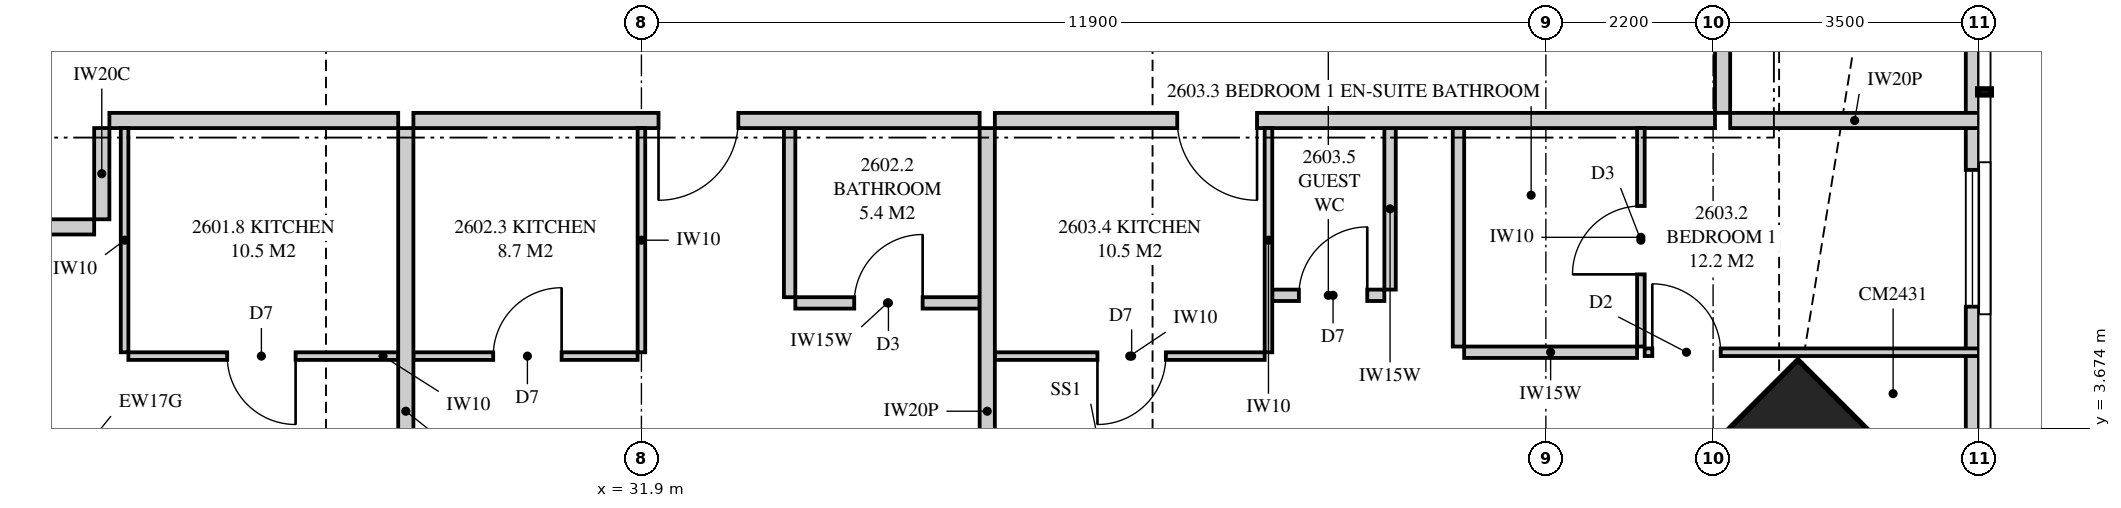
"""IFC4 building model, lengths in metres.
Left out: names, types, materials, properties, quantities, classifications, styles, units other than length and angle.
Written with IfcOpenShell. Run it as: python <this file> out.ifc"""

import sys

from ifc_helpers import new_model, si_unit, direction, frame, frame_2d, origin, origin_2d, place, context, subcontext, project, spatial, polyline, rectangle, outline, extrude, element, fill, save


model = new_model("IFC4")
c1 = context("Model", 3, precision=1e-05, world=origin(), true_north=direction((0.0, 1.0)))
c2 = subcontext(c1, "Body", "Model", "MODEL_VIEW")
j1 = project(units=[si_unit("LENGTHUNIT", "METRE"), si_unit("PLANEANGLEUNIT", "RADIAN")], contexts=[c1])
p1 = place(None, origin())
s1 = spatial("IfcSite", under=j1, at=p1, CompositionType="ELEMENT")
p2 = place(p1, origin())
s2 = spatial("IfcBuilding", under=s1, at=p2, CompositionType="ELEMENT")
p3 = place(p2, frame((0.0, 0.0, 98.15)))
s3 = spatial("IfcBuildingStorey", under=s2, at=p3, CompositionType="ELEMENT", Elevation=98.15)
p4 = place(p3, frame((46.869, 2.631, 0.0), z_axis=(0.0, 0.0, 1.0), x_axis=(-0.707106781187, 0.707106781187, 0.0)))
e1 = element("IfcColumn", 1, at=p4, inside=s3, PredefinedType="COLUMN", context=c2, shape_type="SweptSolid", body=[
    extrude(rectangle(XDim=2.4, YDim=3.1, at=origin_2d()), origin(), (0.0, 0.0, 1.0), 3.35),
])
p5 = place(p3, frame((49.413, 3.051, 0.0), z_axis=(0.0, 0.0, 1.0), x_axis=(0.0, 1.0, 0.0)))
e2 = element("IfcWall", 2, at=p5, inside=s3, PredefinedType="SOLIDWALL", context=c2, shape_type="SweptSolid", body=[
    extrude(outline(polyline([(0.0, 0.0), (31.897, 0.0), (31.897, 3.11), (22.167, 3.11), (22.167, 2.15), (22.074, 2.15), (22.074, 3.11), (21.949, 3.11), (21.949, 2.15), (9.949, 2.15), (9.949, 3.11), (9.823, 3.11), (9.823, 2.15), (9.73, 2.15), (9.73, 3.11), (0.0, 3.11), (0.0, 0.0)])), frame((0.0, 0.087, 0.0), z_axis=(0.0, -1.0, 0.0), x_axis=(1.0, 0.0, 0.0)), (0.0, 0.0, 1.0), 0.175),
])
p6 = place(p5, frame((2.224, 0.0, 0.4)))
e3 = element("IfcOpeningElement", 3, at=p6, cuts=e2, PredefinedType="OPENING", context=c2, shape_type="SweptSolid", body=[
    extrude(rectangle(XDim=1.8, YDim=1.7, at=frame_2d((0.9, 0.85))), frame((0.0, 0.097, 0.0), z_axis=(0.0, -1.0, 0.0), x_axis=(1.0, 0.0, 0.0)), (0.0, 0.0, 1.0), 0.195),
])
p7 = place(p5, frame((14.849, 0.0, 0.4)))
e4 = element("IfcOpeningElement", 4, at=p7, cuts=e2, PredefinedType="OPENING", context=c2, shape_type="SweptSolid", body=[
    extrude(rectangle(XDim=1.2, YDim=1.7, at=frame_2d((0.6, 0.85))), frame((0.0, 0.097, 0.0), z_axis=(0.0, -1.0, 0.0), x_axis=(1.0, 0.0, 0.0)), (0.0, 0.0, 1.0), 0.195),
])
p8 = place(p5, frame((27.373, 0.0, 0.4)))
e5 = element("IfcOpeningElement", 5, at=p8, cuts=e2, PredefinedType="OPENING", context=c2, shape_type="SweptSolid", body=[
    extrude(rectangle(XDim=1.8, YDim=1.7, at=frame_2d((0.9, 0.85))), frame((0.0, 0.097, 0.0), z_axis=(0.0, -1.0, 0.0), x_axis=(1.0, 0.0, 0.0)), (0.0, 0.0, 1.0), 0.195),
])
p9 = place(p3, frame((28.8, 0.175, 0.0), z_axis=(0.0, 0.0, 1.0), x_axis=(0.0, 1.0, 0.0)))
e6 = element("IfcWall", 6, at=p9, inside=s3, PredefinedType="PARTITIONING", context=c2, shape_type="SweptSolid", body=[
    extrude(outline(polyline([(0.529, 2.15), (0.0, 2.15), (0.0, 0.0), (0.529, 0.0), (0.529, 0.786), (1.021, 0.786), (1.021, 0.0), (7.45, 0.0), (7.45, 3.11), (1.685, 3.11), (1.685, 2.15), (1.021, 2.15), (1.021, 1.364), (0.529, 1.364), (0.529, 2.15)])), frame((0.0, 0.1, 0.0), z_axis=(0.0, -1.0, 0.0), x_axis=(1.0, 0.0, 0.0)), (0.0, 0.0, 1.0), 0.2),
])
p10 = place(p3, frame((25.15, 4.625, 0.0), z_axis=(0.0, 0.0, 1.0), x_axis=(1.0, 0.0, 0.0)))
e7 = element("IfcWall", 7, at=p10, inside=s3, PredefinedType="PARTITIONING", context=c2, shape_type="SweptSolid", body=[
    extrude(outline(polyline([(0.0, 0.0), (3.55, 0.0), (3.55, 3.11), (2.887, 3.11), (2.887, 2.541), (2.312, 2.541), (2.312, 3.11), (0.0, 3.11), (0.0, 0.0)])), frame((0.0, 0.05, 0.0), z_axis=(0.0, -1.0, 0.0), x_axis=(1.0, 0.0, 0.0)), (0.0, 0.0, 1.0), 0.1),
])
p11 = place(p10, frame((1.3, 0.0, 0.0)))
e8 = element("IfcOpeningElement", 8, at=p11, cuts=e7, PredefinedType="OPENING", context=c2, shape_type="SweptSolid", body=[
    extrude(rectangle(XDim=0.9, YDim=2.1, at=frame_2d((0.45, 1.05))), frame((0.0, 0.06, 0.0), z_axis=(0.0, -1.0, 0.0), x_axis=(1.0, 0.0, 0.0)), (0.0, 0.0, 1.0), 0.12),
])
p12 = place(p3, frame((25.1, 4.675, 0.0), z_axis=(0.0, 0.0, 1.0), x_axis=(0.0, 1.0, 0.0)))
e9 = element("IfcWall", 9, at=p12, inside=s3, PredefinedType="PARTITIONING", context=c2, shape_type="SweptSolid", body=[
    extrude(rectangle(XDim=2.95, YDim=0.1, at=frame_2d((1.475, 0.0))), origin(), (0.0, 0.0, 1.0), 3.11),
])
p13 = place(p3, frame((36.45, 0.175, 0.0), z_axis=(0.0, 0.0, 1.0), x_axis=(0.0, 1.0, 0.0)))
e10 = element("IfcWall", 10, at=p13, inside=s3, PredefinedType="PARTITIONING", context=c2, shape_type="SweptSolid", body=[
    extrude(outline(polyline([(0.529, 2.15), (0.0, 2.15), (0.0, 0.0), (0.529, 0.0), (0.529, 0.017), (1.021, 0.017), (1.021, 0.0), (7.45, 0.0), (7.45, 3.11), (1.685, 3.11), (1.685, 2.15), (1.021, 2.15), (1.021, 2.133), (0.529, 2.133), (0.529, 2.15)])), frame((0.0, 0.1, 0.0), z_axis=(0.0, -1.0, 0.0), x_axis=(1.0, 0.0, 0.0)), (0.0, 0.0, 1.0), 0.2),
])
p14 = place(p3, frame((28.9, 7.725, 0.0), z_axis=(0.0, 0.0, 1.0), x_axis=(1.0, 0.0, 0.0)))
e11 = element("IfcWall", 11, at=p14, inside=s3, PredefinedType="PARTITIONING", context=c2, shape_type="SweptSolid", body=[
    extrude(rectangle(XDim=7.45, YDim=0.2, at=frame_2d((3.725, 0.0))), origin(), (0.0, 0.0, 1.0), 3.11),
])
p15 = place(p14, frame((3.225, 0.0, 0.0)))
e12 = element("IfcOpeningElement", 12, at=p15, cuts=e11, PredefinedType="OPENING", context=c2, shape_type="SweptSolid", body=[
    extrude(rectangle(XDim=1.05, YDim=2.2, at=frame_2d((0.525, 1.1))), frame((0.0, 0.11, 0.0), z_axis=(0.0, -1.0, 0.0), x_axis=(1.0, 0.0, 0.0)), (0.0, 0.0, 1.0), 0.22),
])
p16 = place(p3, frame((33.925, 5.325, 0.0), z_axis=(0.0, 0.0, 1.0), x_axis=(1.0, 0.0, 0.0)))
e13 = element("IfcWall", 13, at=p16, inside=s3, PredefinedType="PLUMBINGWALL", context=c2, shape_type="SweptSolid", body=[
    extrude(rectangle(XDim=2.425, YDim=0.15, at=frame_2d((1.212, 0.0))), origin(), (0.0, 0.0, 1.0), 3.11),
])
p17 = place(p16, frame((0.775, 0.0, 0.0)))
e14 = element("IfcOpeningElement", 14, at=p17, cuts=e13, PredefinedType="OPENING", context=c2, shape_type="SweptSolid", body=[
    extrude(rectangle(XDim=0.9, YDim=2.1, at=frame_2d((0.45, 1.05))), frame((0.0, 0.085, 0.0), z_axis=(0.0, -1.0, 0.0), x_axis=(1.0, 0.0, 0.0)), (0.0, 0.0, 1.0), 0.17),
])
p18 = place(p3, frame((33.85, 5.4, 0.0), z_axis=(0.0, 0.0, 1.0), x_axis=(0.0, 1.0, 0.0)))
e15 = element("IfcWall", 15, at=p18, inside=s3, PredefinedType="PLUMBINGWALL", context=c2, shape_type="SweptSolid", body=[
    extrude(rectangle(XDim=2.225, YDim=0.15, at=frame_2d((1.113, 0.0))), origin(), (0.0, 0.0, 1.0), 3.11),
])
p19 = place(p3, frame((28.9, 4.625, 0.0), z_axis=(0.0, 0.0, 1.0), x_axis=(1.0, 0.0, 0.0)))
e16 = element("IfcWall", 16, at=p19, inside=s3, PredefinedType="PARTITIONING", context=c2, shape_type="SweptSolid", body=[
    extrude(rectangle(XDim=2.95, YDim=0.1, at=frame_2d((1.475, 0.0))), origin(), (0.0, 0.0, 1.0), 3.11),
])
p20 = place(p19, frame((1.05, 0.0, 0.0)))
e17 = element("IfcOpeningElement", 17, at=p20, cuts=e16, PredefinedType="OPENING", context=c2, shape_type="SweptSolid", body=[
    extrude(rectangle(XDim=0.9, YDim=2.1, at=frame_2d((0.45, 1.05))), frame((0.0, 0.06, 0.0), z_axis=(0.0, -1.0, 0.0), x_axis=(1.0, 0.0, 0.0)), (0.0, 0.0, 1.0), 0.12),
])
p21 = place(p3, frame((31.9, 4.675, 0.0), z_axis=(0.0, 0.0, 1.0), x_axis=(0.0, 1.0, 0.0)))
e18 = element("IfcWall", 18, at=p21, inside=s3, PredefinedType="PARTITIONING", context=c2, shape_type="SweptSolid", body=[
    extrude(rectangle(XDim=2.95, YDim=0.1, at=frame_2d((1.475, 0.0))), origin(), (0.0, 0.0, 1.0), 3.11),
])
p22 = place(p3, frame((36.55, 7.725, 0.0), z_axis=(0.0, 0.0, 1.0), x_axis=(1.0, 0.0, 0.0)))
e19 = element("IfcWall", 19, at=p22, inside=s3, PredefinedType="PARTITIONING", context=c2, shape_type="SweptSolid", body=[
    extrude(outline(polyline([(0.0, 0.0), (9.475, 0.0), (9.475, 3.11), (2.412, 3.11), (2.412, 2.541), (1.738, 2.541), (1.738, 3.11), (0.0, 3.11), (0.0, 0.0)])), frame((0.0, 0.1, 0.0), z_axis=(0.0, -1.0, 0.0), x_axis=(1.0, 0.0, 0.0)), (0.0, 0.0, 1.0), 0.2),
])
p23 = place(p22, frame((2.4, 0.0, 0.0)))
e20 = element("IfcOpeningElement", 20, at=p23, cuts=e19, PredefinedType="OPENING", context=c2, shape_type="SweptSolid", body=[
    extrude(rectangle(XDim=1.05, YDim=2.2, at=frame_2d((0.525, 1.1))), frame((0.0, 0.11, 0.0), z_axis=(0.0, -1.0, 0.0), x_axis=(1.0, 0.0, 0.0)), (0.0, 0.0, 1.0), 0.22),
])
p24 = place(p3, frame((45.05, 4.751, 0.0), z_axis=(0.0, 0.0, 1.0), x_axis=(0.0, 1.0, 0.0)))
e21 = element("IfcWall", 21, at=p24, inside=s3, PredefinedType="PARTITIONING", context=c2, shape_type="SweptSolid", body=[
    extrude(rectangle(XDim=2.874, YDim=0.1, at=frame_2d((1.437, 0.0))), origin(), (0.0, 0.0, 1.0), 3.11),
])
p25 = place(p24, frame((0.949, 0.0, 0.0)))
e22 = element("IfcOpeningElement", 22, at=p25, cuts=e21, PredefinedType="OPENING", context=c2, shape_type="SweptSolid", body=[
    extrude(rectangle(XDim=0.9, YDim=2.1, at=frame_2d((0.45, 1.05))), frame((0.0, 0.06, 0.0), z_axis=(0.0, -1.0, 0.0), x_axis=(1.0, 0.0, 0.0)), (0.0, 0.0, 1.0), 0.12),
])
p26 = place(p3, frame((45.1, 4.676, 0.0), z_axis=(0.0, 0.0, 1.0), x_axis=(1.0, 0.0, 0.0)))
e23 = element("IfcWall", 23, at=p26, inside=s3, PredefinedType="PARTITIONING", context=c2, shape_type="SweptSolid", body=[
    extrude(outline(polyline([(0.0, 0.0), (4.4, 0.0), (4.4, 3.11), (2.971, 3.11), (2.971, 2.15), (1.229, 2.15), (1.229, 3.11), (0.0, 3.11), (0.0, 0.0)])), frame((0.0, 0.05, 0.0), z_axis=(0.0, -1.0, 0.0), x_axis=(1.0, 0.0, 0.0)), (0.0, 0.0, 1.0), 0.1),
])
p27 = place(p26, frame((0.1, 0.0, 0.0)))
e24 = element("IfcOpeningElement", 24, at=p27, cuts=e23, PredefinedType="OPENING", context=c2, shape_type="SweptSolid", body=[
    extrude(rectangle(XDim=0.9, YDim=2.1, at=frame_2d((0.45, 1.05))), frame((0.0, 0.06, 0.0), z_axis=(0.0, -1.0, 0.0), x_axis=(1.0, 0.0, 0.0)), (0.0, 0.0, 1.0), 0.12),
])
p28 = place(p3, frame((42.725, 4.676, 0.0), z_axis=(0.0, 0.0, 1.0), x_axis=(1.0, 0.0, 0.0)))
e25 = element("IfcWall", 25, at=p28, inside=s3, PredefinedType="PLUMBINGWALL", context=c2, shape_type="SweptSolid", body=[
    extrude(rectangle(XDim=2.275, YDim=0.15, at=frame_2d((1.137, 0.0))), origin(), (0.0, 0.0, 1.0), 3.11),
])
p29 = place(p3, frame((42.65, 4.751, 0.0), z_axis=(0.0, 0.0, 1.0), x_axis=(0.0, 1.0, 0.0)))
e26 = element("IfcWall", 26, at=p29, inside=s3, PredefinedType="PLUMBINGWALL", context=c2, shape_type="SweptSolid", body=[
    extrude(rectangle(XDim=2.874, YDim=0.15, at=frame_2d((1.437, 0.0))), origin(), (0.0, 0.0, 1.0), 3.11),
])
p30 = place(p3, frame((36.55, 4.625, 0.0), z_axis=(0.0, 0.0, 1.0), x_axis=(1.0, 0.0, 0.0)))
e27 = element("IfcWall", 27, at=p30, inside=s3, PredefinedType="PARTITIONING", context=c2, shape_type="SweptSolid", body=[
    extrude(outline(polyline([(0.0, 0.0), (3.55, 0.0), (3.55, 3.11), (2.362, 3.11), (2.362, 2.541), (1.788, 2.541), (1.788, 3.11), (0.0, 3.11), (0.0, 0.0)])), frame((0.0, 0.05, 0.0), z_axis=(0.0, -1.0, 0.0), x_axis=(1.0, 0.0, 0.0)), (0.0, 0.0, 1.0), 0.1),
])
p31 = place(p30, frame((1.35, 0.0, 0.0)))
e28 = element("IfcOpeningElement", 28, at=p31, cuts=e27, PredefinedType="OPENING", context=c2, shape_type="SweptSolid", body=[
    extrude(rectangle(XDim=0.9, YDim=2.1, at=frame_2d((0.45, 1.05))), frame((0.0, 0.06, 0.0), z_axis=(0.0, -1.0, 0.0), x_axis=(1.0, 0.0, 0.0)), (0.0, 0.0, 1.0), 0.12),
])
p32 = place(p3, frame((40.15, 4.675, 0.0), z_axis=(0.0, 0.0, 1.0), x_axis=(0.0, 1.0, 0.0)))
e29 = element("IfcWall", 29, at=p32, inside=s3, PredefinedType="PARTITIONING", context=c2, shape_type="SweptSolid", body=[
    extrude(rectangle(XDim=2.95, YDim=0.1, at=frame_2d((1.475, 0.0))), origin(), (0.0, 0.0, 1.0), 3.11),
])
p33 = place(p3, frame((40.2, 5.425, 0.0), z_axis=(0.0, 0.0, 1.0), x_axis=(1.0, 0.0, 0.0)))
e30 = element("IfcWall", 30, at=p33, inside=s3, PredefinedType="PLUMBINGWALL", context=c2, shape_type="SweptSolid", body=[
    extrude(rectangle(XDim=1.475, YDim=0.15, at=frame_2d((0.738, 0.0))), origin(), (0.0, 0.0, 1.0), 3.11),
])
p34 = place(p33, frame((0.35, 0.0, 0.0)))
e31 = element("IfcOpeningElement", 31, at=p34, cuts=e30, PredefinedType="OPENING", context=c2, shape_type="SweptSolid", body=[
    extrude(rectangle(XDim=0.9, YDim=2.1, at=frame_2d((0.45, 1.05))), frame((0.0, 0.085, 0.0), z_axis=(0.0, -1.0, 0.0), x_axis=(1.0, 0.0, 0.0)), (0.0, 0.0, 1.0), 0.17),
])
p35 = place(p3, frame((41.75, 5.5, 0.0), z_axis=(0.0, 0.0, 1.0), x_axis=(0.0, 1.0, 0.0)))
e32 = element("IfcWall", 32, at=p35, inside=s3, PredefinedType="PLUMBINGWALL", context=c2, shape_type="SweptSolid", body=[
    extrude(rectangle(XDim=2.125, YDim=0.15, at=frame_2d((1.062, 0.0))), origin(), (0.0, 0.0, 1.0), 3.11),
])
p36 = place(p3, frame((46.225, 7.725, 0.0), z_axis=(0.0, 0.0, 1.0), x_axis=(1.0, 0.0, 0.0)))
e33 = element("IfcWall", 33, at=p36, inside=s3, PredefinedType="PARTITIONING", context=c2, shape_type="SweptSolid", body=[
    extrude(outline(polyline([(0.0, 0.0), (3.275, 0.0), (3.275, 3.11), (2.392, 3.11), (2.392, 2.15), (0.643, 2.15), (0.643, 2.541), (0.306, 2.541), (0.306, 3.11), (0.0, 3.11), (0.0, 0.0)])), frame((0.0, 0.1, 0.0), z_axis=(0.0, -1.0, 0.0), x_axis=(1.0, 0.0, 0.0)), (0.0, 0.0, 1.0), 0.2),
])
p37 = place(p3, frame((46.125, 7.825, 0.0), z_axis=(0.0, 0.0, 1.0), x_axis=(0.0, 1.0, 0.0)))
e34 = element("IfcWall", 34, at=p37, inside=s3, PredefinedType="PARTITIONING", context=c2, shape_type="SweptSolid", body=[
    extrude(outline(polyline([(0.0, 0.0), (8.475, 0.0), (8.475, 3.11), (5.512, 3.11), (5.512, 2.541), (4.838, 2.541), (4.838, 3.11), (0.0, 3.11), (0.0, 0.0)])), frame((0.0, 0.1, 0.0), z_axis=(0.0, -1.0, 0.0), x_axis=(1.0, 0.0, 0.0)), (0.0, 0.0, 1.0), 0.2),
])
p38 = place(p3, frame((24.9, 7.725, 0.0), z_axis=(0.0, 0.0, 1.0), x_axis=(1.0, 0.0, 0.0)))
e35 = element("IfcWall", 35, at=p38, inside=s3, PredefinedType="PARTITIONING", context=c2, shape_type="SweptSolid", body=[
    extrude(outline(polyline([(0.0, 0.0), (3.8, 0.0), (3.8, 3.11), (3.187, 3.11), (3.187, 2.541), (2.513, 2.541), (2.513, 3.11), (0.0, 3.11), (0.0, 0.0)])), frame((0.0, 0.1, 0.0), z_axis=(0.0, -1.0, 0.0), x_axis=(1.0, 0.0, 0.0)), (0.0, 0.0, 1.0), 0.2),
])
p39 = place(p3, frame((22.3, 6.325, 0.0), z_axis=(0.0, 0.0, 1.0), x_axis=(1.0, 0.0, 0.0)))
e36 = element("IfcWall", 36, at=p39, inside=s3, PredefinedType="PARTITIONING", context=c2, shape_type="SweptSolid", body=[
    extrude(rectangle(XDim=2.4, YDim=0.2, at=frame_2d((1.2, 0.0))), origin(), (0.0, 0.0, 1.0), 3.11),
])
p40 = place(p39, frame((0.1, 0.0, 0.0)))
e37 = element("IfcOpeningElement", 37, at=p40, cuts=e36, PredefinedType="OPENING", context=c2, shape_type="SweptSolid", body=[
    extrude(rectangle(XDim=1.05, YDim=2.2, at=frame_2d((0.525, 1.1))), frame((0.0, 0.11, 0.0), z_axis=(0.0, -1.0, 0.0), x_axis=(1.0, 0.0, 0.0)), (0.0, 0.0, 1.0), 0.22),
])
p41 = place(p3, frame((24.8, 7.625, 0.0), z_axis=(0.0, 0.0, 1.0), x_axis=(0.0, -1.0, 0.0)))
e38 = element("IfcWall", 38, at=p41, inside=s3, PredefinedType="PARTITIONING", context=c2, shape_type="SweptSolid", body=[
    extrude(rectangle(XDim=1.2, YDim=0.2, at=frame_2d((0.6, 0.0))), origin(), (0.0, 0.0, 1.0), 3.11),
])
p42 = place(p6, origin())
e39 = element("IfcWindow", 39, at=p42, inside=s3, PartitioningType="SINGLE_PANEL", PredefinedType="WINDOW", context=c2, shape_type="SweptSolid", body=[
    extrude(rectangle(XDim=1.8, YDim=1.7, at=frame_2d((0.9, 0.85))), frame((0.0, 0.03, 0.0), z_axis=(0.0, -1.0, 0.0), x_axis=(1.0, 0.0, 0.0)), (0.0, 0.0, 1.0), 0.06),
])
fill(e3, e39)
p43 = place(p11, frame((0.9, 0.0, 0.0), z_axis=(0.0, 0.0, 1.0), x_axis=(-1.0, 0.0, 0.0)))
e40 = element("IfcDoor", 40, at=p43, inside=s3, OperationType="SINGLE_SWING_LEFT", PredefinedType="DOOR", context=c2, shape_type="SweptSolid", body=[
    extrude(rectangle(XDim=0.9, YDim=2.1, at=frame_2d((0.45, 1.05))), frame((0.0, 0.025, 0.0), z_axis=(0.0, -1.0, 0.0), x_axis=(1.0, 0.0, 0.0)), (0.0, 0.0, 1.0), 0.05),
])
fill(e8, e40)
p44 = place(p15, frame((1.05, 0.0, 0.0), z_axis=(0.0, 0.0, 1.0), x_axis=(-1.0, 0.0, 0.0)))
e41 = element("IfcDoor", 41, at=p44, inside=s3, OperationType="SINGLE_SWING_RIGHT", PredefinedType="DOOR", context=c2, shape_type="SweptSolid", body=[
    extrude(rectangle(XDim=1.05, YDim=2.2, at=frame_2d((0.525, 1.1))), frame((0.0, 0.025, 0.0), z_axis=(0.0, -1.0, 0.0), x_axis=(1.0, 0.0, 0.0)), (0.0, 0.0, 1.0), 0.05),
])
fill(e12, e41)
p45 = place(p17, origin())
e42 = element("IfcDoor", 42, at=p45, inside=s3, OperationType="SINGLE_SWING_RIGHT", PredefinedType="DOOR", context=c2, shape_type="SweptSolid", body=[
    extrude(rectangle(XDim=0.9, YDim=2.1, at=frame_2d((0.45, 1.05))), frame((0.0, 0.025, 0.0), z_axis=(0.0, -1.0, 0.0), x_axis=(1.0, 0.0, 0.0)), (0.0, 0.0, 1.0), 0.05),
])
fill(e14, e42)
p46 = place(p20, origin())
e43 = element("IfcDoor", 43, at=p46, inside=s3, OperationType="SINGLE_SWING_RIGHT", PredefinedType="DOOR", context=c2, shape_type="SweptSolid", body=[
    extrude(rectangle(XDim=0.9, YDim=2.1, at=frame_2d((0.45, 1.05))), frame((0.0, 0.025, 0.0), z_axis=(0.0, -1.0, 0.0), x_axis=(1.0, 0.0, 0.0)), (0.0, 0.0, 1.0), 0.05),
])
fill(e17, e43)
p47 = place(p23, frame((1.05, 0.0, 0.0), z_axis=(0.0, 0.0, 1.0), x_axis=(-1.0, 0.0, 0.0)))
e44 = element("IfcDoor", 44, at=p47, inside=s3, OperationType="SINGLE_SWING_LEFT", PredefinedType="DOOR", context=c2, shape_type="SweptSolid", body=[
    extrude(rectangle(XDim=1.05, YDim=2.2, at=frame_2d((0.525, 1.1))), frame((0.0, 0.025, 0.0), z_axis=(0.0, -1.0, 0.0), x_axis=(1.0, 0.0, 0.0)), (0.0, 0.0, 1.0), 0.05),
])
fill(e20, e44)
p48 = place(p27, origin())
e45 = element("IfcDoor", 45, at=p48, inside=s3, OperationType="SINGLE_SWING_LEFT", PredefinedType="DOOR", context=c2, shape_type="SweptSolid", body=[
    extrude(rectangle(XDim=0.9, YDim=2.1, at=frame_2d((0.45, 1.05))), frame((0.0, 0.025, 0.0), z_axis=(0.0, -1.0, 0.0), x_axis=(1.0, 0.0, 0.0)), (0.0, 0.0, 1.0), 0.05),
])
fill(e24, e45)
p49 = place(p25, origin())
e46 = element("IfcDoor", 46, at=p49, inside=s3, OperationType="SINGLE_SWING_LEFT", PredefinedType="DOOR", context=c2, shape_type="SweptSolid", body=[
    extrude(rectangle(XDim=0.9, YDim=2.1, at=frame_2d((0.45, 1.05))), frame((0.0, 0.025, 0.0), z_axis=(0.0, -1.0, 0.0), x_axis=(1.0, 0.0, 0.0)), (0.0, 0.0, 1.0), 0.05),
])
fill(e22, e46)
p50 = place(p31, frame((0.9, 0.0, 0.0), z_axis=(0.0, 0.0, 1.0), x_axis=(-1.0, 0.0, 0.0)))
e47 = element("IfcDoor", 47, at=p50, inside=s3, OperationType="SINGLE_SWING_RIGHT", PredefinedType="DOOR", context=c2, shape_type="SweptSolid", body=[
    extrude(rectangle(XDim=0.9, YDim=2.1, at=frame_2d((0.45, 1.05))), frame((0.0, 0.025, 0.0), z_axis=(0.0, -1.0, 0.0), x_axis=(1.0, 0.0, 0.0)), (0.0, 0.0, 1.0), 0.05),
])
fill(e28, e47)
p51 = place(p34, origin())
e48 = element("IfcDoor", 48, at=p51, inside=s3, OperationType="SINGLE_SWING_RIGHT", PredefinedType="DOOR", context=c2, shape_type="SweptSolid", body=[
    extrude(rectangle(XDim=0.9, YDim=2.1, at=frame_2d((0.45, 1.05))), frame((0.0, 0.025, 0.0), z_axis=(0.0, -1.0, 0.0), x_axis=(1.0, 0.0, 0.0)), (0.0, 0.0, 1.0), 0.05),
])
fill(e31, e48)
save(model, sys.argv[1])
